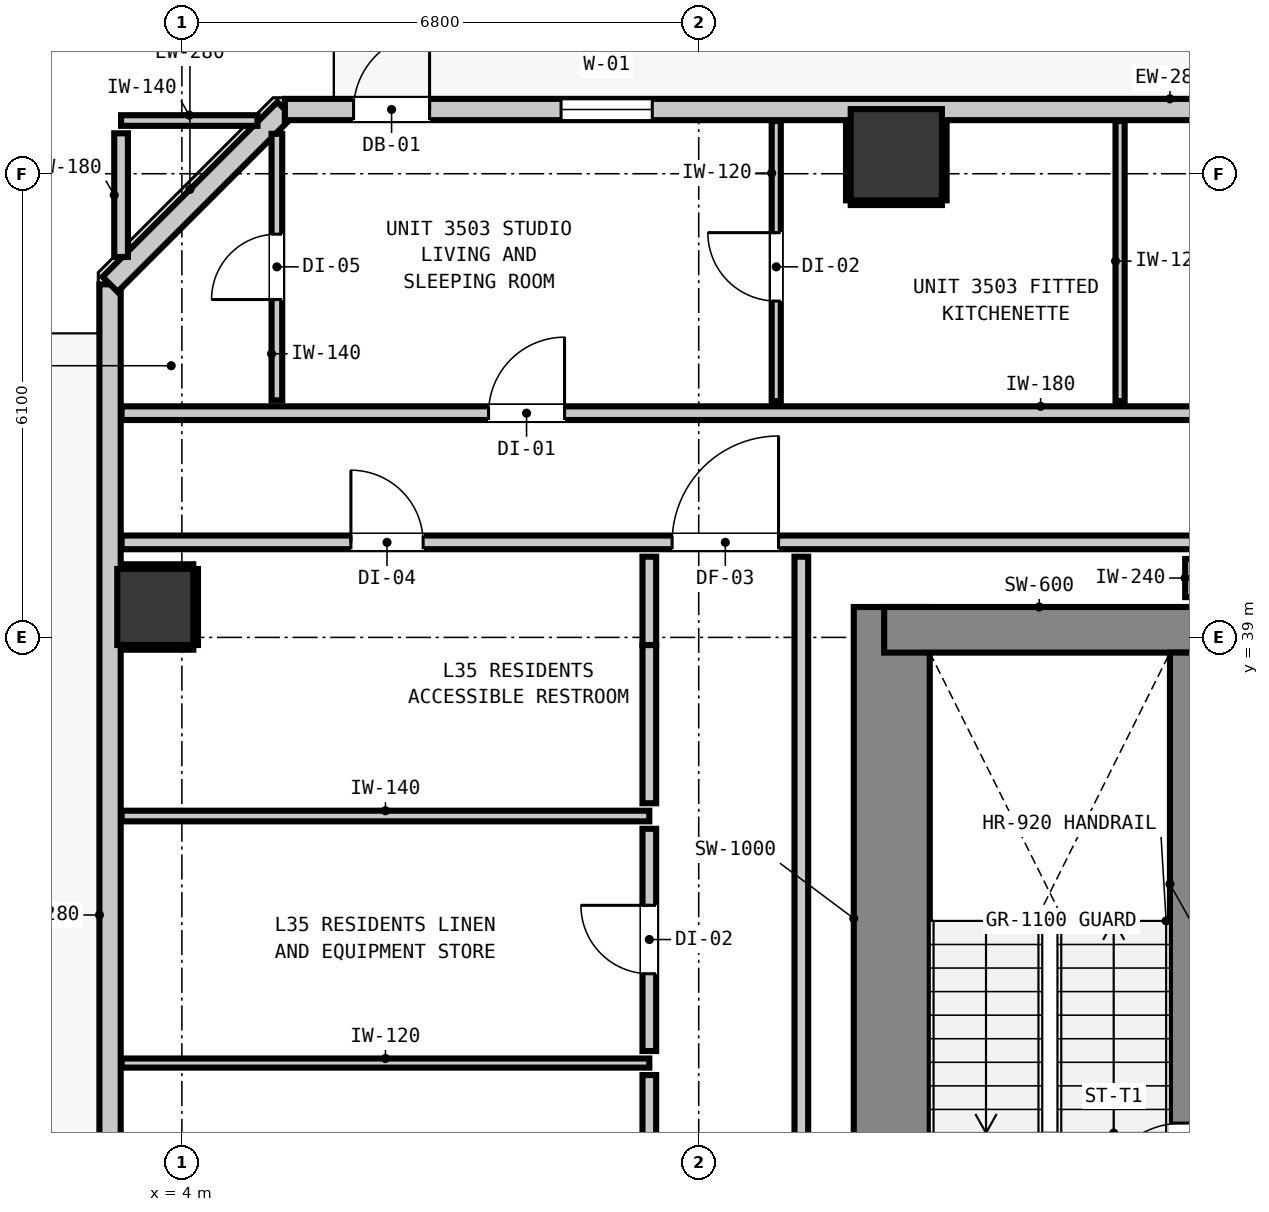
"""IFC4 building model, lengths in metres.
Left out: names, types, materials, properties, quantities, classifications, styles, units other than length and angle.
Written with IfcOpenShell. Run it as: python <this file> out.ifc"""

import sys

from ifc_helpers import new_model, si_unit, direction, frame, frame_2d, origin, origin_2d, place, context, subcontext, project, spatial, rectangle, extrude, element, fill, save


model = new_model("IFC4")
c1 = context("Model", 3, precision=1e-05, world=origin(), true_north=direction((0.0, 1.0)))
c2 = subcontext(c1, "Body", "Model", "MODEL_VIEW")
j1 = project(units=[si_unit("LENGTHUNIT", "METRE"), si_unit("PLANEANGLEUNIT", "RADIAN")], contexts=[c1])
p1 = place(None, origin())
s1 = spatial("IfcSite", under=j1, at=p1, CompositionType="ELEMENT")
p2 = place(p1, origin())
s2 = spatial("IfcBuilding", under=s1, at=p2, CompositionType="ELEMENT")
p3 = place(p2, frame((0.0, 0.0, 122.68)))
s3 = spatial("IfcBuildingStorey", under=s2, at=p3, CompositionType="ELEMENT", Elevation=122.68)
p4 = place(p3, frame((13.34, 31.205, 0.0), z_axis=(0.0, 0.0, 1.0), x_axis=(0.0, 1.0, 0.0)))
e1 = element("IfcWall", 1, at=p4, inside=s3, PredefinedType="SHEAR", context=c2, shape_type="SweptSolid", body=[
    extrude(rectangle(XDim=8.195, YDim=1.0, at=frame_2d((4.097, 0.0))), origin(), (0.0, 0.0, 1.0), 3.32),
])
p5 = place(p3, frame((13.24, 39.1, 0.0), z_axis=(0.0, 0.0, 1.0), x_axis=(1.0, 0.0, 0.0)))
e2 = element("IfcWall", 2, at=p5, inside=s3, PredefinedType="SHEAR", context=c2, shape_type="SweptSolid", body=[
    extrude(rectangle(XDim=4.08, YDim=0.6, at=frame_2d((2.04, 0.0))), origin(), (0.0, 0.0, 1.0), 3.32),
])
p6 = place(p3, frame((17.16, 31.0, 0.0), z_axis=(0.0, 0.0, 1.0), x_axis=(0.0, 1.0, 0.0)))
e3 = element("IfcWall", 3, at=p6, inside=s3, PredefinedType="SHEAR", context=c2, shape_type="SweptSolid", body=[
    extrude(rectangle(XDim=7.8, YDim=0.32, at=frame_2d((3.9, 0.0))), origin(), (0.0, 0.0, 1.0), 3.32),
])
p7 = place(p6, frame((0.51, 0.0, 0.0)))
e4 = element("IfcOpeningElement", 4, at=p7, cuts=e3, PredefinedType="OPENING", context=c2, shape_type="SweptSolid", body=[
    extrude(rectangle(XDim=1.1, YDim=2.15, at=frame_2d((0.55, 1.075))), frame((0.0, 0.17, 0.0), z_axis=(0.0, -1.0, 0.0), x_axis=(1.0, 0.0, 0.0)), (0.0, 0.0, 1.0), 0.34),
])
p8 = place(p3, frame((13.4, 45.35, 0.0), z_axis=(0.0, 0.0, 1.0), x_axis=(1.0, 0.0, 0.0)))
e5 = element("IfcColumn", 5, at=p8, inside=s3, PredefinedType="COLUMN", context=c2, shape_type="SweptSolid", body=[
    extrude(rectangle(XDim=1.2, YDim=1.2, at=origin_2d()), origin(), (0.0, 0.0, 1.0), 2.9),
])
p9 = place(p3, frame((3.65, 39.4, 0.0), z_axis=(0.0, 0.0, 1.0), x_axis=(1.0, 0.0, 0.0)))
e6 = element("IfcColumn", 6, at=p9, inside=s3, PredefinedType="COLUMN", context=c2, shape_type="SweptSolid", body=[
    extrude(rectangle(XDim=1.0, YDim=1.0, at=origin_2d()), origin(), (0.0, 0.0, 1.0), 2.9),
])
p10 = place(p3, frame((3.055, 11.355, 0.0), z_axis=(0.0, 0.0, 1.0), x_axis=(0.0, 1.0, 0.0)))
e7 = element("IfcWall", 7, at=p10, inside=s3, PredefinedType="STANDARD", context=c2, shape_type="SweptSolid", body=[
    extrude(rectangle(XDim=32.29, YDim=0.28, at=frame_2d((16.145, 0.0))), origin(), (0.0, 0.0, 1.0), 2.9),
])
p11 = place(p10, frame((5.818, 0.0, 0.0)))
e8 = element("IfcOpeningElement", 8, at=p11, cuts=e7, PredefinedType="OPENING", context=c2, shape_type="SweptSolid", body=[
    extrude(rectangle(XDim=1.0, YDim=2.15, at=frame_2d((0.5, 1.075))), frame((0.0, 0.15, 0.0), z_axis=(0.0, -1.0, 0.0), x_axis=(1.0, 0.0, 0.0)), (0.0, 0.0, 1.0), 0.3),
])
p12 = place(p10, frame((0.47, 0.0, 0.85)))
e9 = element("IfcOpeningElement", 9, at=p12, cuts=e7, PredefinedType="OPENING", context=c2, shape_type="SweptSolid", body=[
    extrude(rectangle(XDim=1.2, YDim=1.8, at=frame_2d((0.6, 0.9))), frame((0.0, 0.15, 0.0), z_axis=(0.0, -1.0, 0.0), x_axis=(1.0, 0.0, 0.0)), (0.0, 0.0, 1.0), 0.3),
])
p13 = place(p10, frame((14.395, 0.0, 0.85)))
e10 = element("IfcOpeningElement", 10, at=p13, cuts=e7, PredefinedType="OPENING", context=c2, shape_type="SweptSolid", body=[
    extrude(rectangle(XDim=1.2, YDim=1.8, at=frame_2d((0.6, 0.9))), frame((0.0, 0.15, 0.0), z_axis=(0.0, -1.0, 0.0), x_axis=(1.0, 0.0, 0.0)), (0.0, 0.0, 1.0), 0.3),
])
p14 = place(p3, frame((3.055, 43.645, 0.0), z_axis=(0.0, 0.0, 1.0), x_axis=(0.707106781187, 0.707106781187, 0.0)))
e11 = element("IfcWall", 11, at=p14, inside=s3, PredefinedType="STANDARD", context=c2, shape_type="SweptSolid", body=[
    extrude(rectangle(XDim=3.253, YDim=0.28, at=frame_2d((1.626, 0.0))), origin(), (0.0, 0.0, 1.0), 2.9),
])
p15 = place(p3, frame((5.355, 45.945, 0.0), z_axis=(0.0, 0.0, 1.0), x_axis=(1.0, 0.0, 0.0)))
e12 = element("IfcWall", 12, at=p15, inside=s3, PredefinedType="STANDARD", context=c2, shape_type="SweptSolid", body=[
    extrude(rectangle(XDim=35.09, YDim=0.28, at=frame_2d((17.545, 0.0))), origin(), (0.0, 0.0, 1.0), 2.9),
])
p16 = place(p15, frame((0.904, 0.0, 0.0)))
e13 = element("IfcOpeningElement", 13, at=p16, cuts=e12, PredefinedType="OPENING", context=c2, shape_type="SweptSolid", body=[
    extrude(rectangle(XDim=1.0, YDim=2.15, at=frame_2d((0.5, 1.075))), frame((0.0, 0.15, 0.0), z_axis=(0.0, -1.0, 0.0), x_axis=(1.0, 0.0, 0.0)), (0.0, 0.0, 1.0), 0.3),
])
p17 = place(p15, frame((3.634, 0.0, 0.85)))
e14 = element("IfcOpeningElement", 14, at=p17, cuts=e12, PredefinedType="OPENING", context=c2, shape_type="SweptSolid", body=[
    extrude(rectangle(XDim=1.2, YDim=1.8, at=frame_2d((0.6, 0.9))), frame((0.0, 0.15, 0.0), z_axis=(0.0, -1.0, 0.0), x_axis=(1.0, 0.0, 0.0)), (0.0, 0.0, 1.0), 0.3),
])
p18 = place(p15, frame((18.455, 0.0, 0.85)))
e15 = element("IfcOpeningElement", 15, at=p18, cuts=e12, PredefinedType="OPENING", context=c2, shape_type="SweptSolid", body=[
    extrude(rectangle(XDim=1.2, YDim=1.8, at=frame_2d((0.6, 0.9))), frame((0.0, 0.15, 0.0), z_axis=(0.0, -1.0, 0.0), x_axis=(1.0, 0.0, 0.0)), (0.0, 0.0, 1.0), 0.3),
])
p19 = place(p15, frame((26.895, 0.0, 0.85)))
e16 = element("IfcOpeningElement", 16, at=p19, cuts=e12, PredefinedType="OPENING", context=c2, shape_type="SweptSolid", body=[
    extrude(rectangle(XDim=1.2, YDim=1.8, at=frame_2d((0.6, 0.9))), frame((0.0, 0.15, 0.0), z_axis=(0.0, -1.0, 0.0), x_axis=(1.0, 0.0, 0.0)), (0.0, 0.0, 1.0), 0.3),
])
p20 = place(p3, frame((3.207, 40.25, 0.0), z_axis=(0.0, 0.0, 1.0), x_axis=(1.0, 0.0, 0.0)))
e17 = element("IfcWall", 17, at=p20, inside=s3, PredefinedType="PARTITIONING", context=c2, shape_type="SweptSolid", body=[
    extrude(rectangle(XDim=39.386, YDim=0.18, at=frame_2d((19.693, 0.0))), origin(), (0.0, 0.0, 1.0), 2.9),
])
p21 = place(p20, frame((14.228, 0.0, 0.0)))
e18 = element("IfcOpeningElement", 18, at=p21, cuts=e17, PredefinedType="OPENING", context=c2, shape_type="SweptSolid", body=[
    extrude(rectangle(XDim=1.4, YDim=2.15, at=frame_2d((0.7, 1.075))), frame((0.0, 0.1, 0.0), z_axis=(0.0, -1.0, 0.0), x_axis=(1.0, 0.0, 0.0)), (0.0, 0.0, 1.0), 0.2),
])
p22 = place(p20, frame((7.243, 0.0, 0.0)))
e19 = element("IfcOpeningElement", 19, at=p22, cuts=e17, PredefinedType="OPENING", context=c2, shape_type="SweptSolid", body=[
    extrude(rectangle(XDim=1.4, YDim=2.15, at=frame_2d((0.7, 1.075))), frame((0.0, 0.1, 0.0), z_axis=(0.0, -1.0, 0.0), x_axis=(1.0, 0.0, 0.0)), (0.0, 0.0, 1.0), 0.2),
])
p23 = place(p20, frame((34.843, 0.0, 0.0)))
e20 = element("IfcOpeningElement", 20, at=p23, cuts=e17, PredefinedType="OPENING", context=c2, shape_type="SweptSolid", body=[
    extrude(rectangle(XDim=1.4, YDim=2.15, at=frame_2d((0.7, 1.075))), frame((0.0, 0.1, 0.0), z_axis=(0.0, -1.0, 0.0), x_axis=(1.0, 0.0, 0.0)), (0.0, 0.0, 1.0), 0.2),
])
p24 = place(p20, frame((3.017, 0.0, 0.0)))
e21 = element("IfcOpeningElement", 21, at=p24, cuts=e17, PredefinedType="OPENING", context=c2, shape_type="SweptSolid", body=[
    extrude(rectangle(XDim=0.95, YDim=2.1, at=frame_2d((0.475, 1.05))), frame((0.0, 0.1, 0.0), z_axis=(0.0, -1.0, 0.0), x_axis=(1.0, 0.0, 0.0)), (0.0, 0.0, 1.0), 0.2),
])
p25 = place(p20, frame((37.414, 0.0, 0.0)))
e22 = element("IfcOpeningElement", 22, at=p25, cuts=e17, PredefinedType="OPENING", context=c2, shape_type="SweptSolid", body=[
    extrude(rectangle(XDim=0.9, YDim=2.1, at=frame_2d((0.45, 1.05))), frame((0.0, 0.1, 0.0), z_axis=(0.0, -1.0, 0.0), x_axis=(1.0, 0.0, 0.0)), (0.0, 0.0, 1.0), 0.2),
])
p26 = place(p3, frame((3.207, 41.95, 0.0), z_axis=(0.0, 0.0, 1.0), x_axis=(1.0, 0.0, 0.0)))
e23 = element("IfcWall", 23, at=p26, inside=s3, PredefinedType="PARTITIONING", context=c2, shape_type="SweptSolid", body=[
    extrude(rectangle(XDim=39.386, YDim=0.18, at=frame_2d((19.693, 0.0))), origin(), (0.0, 0.0, 1.0), 2.9),
])
p27 = place(p26, frame((4.828, 0.0, 0.0)))
e24 = element("IfcOpeningElement", 24, at=p27, cuts=e23, PredefinedType="OPENING", context=c2, shape_type="SweptSolid", body=[
    extrude(rectangle(XDim=1.0, YDim=2.15, at=frame_2d((0.5, 1.075))), frame((0.0, 0.1, 0.0), z_axis=(0.0, -1.0, 0.0), x_axis=(1.0, 0.0, 0.0)), (0.0, 0.0, 1.0), 0.2),
])
p28 = place(p26, frame((18.355, 0.0, 0.0)))
e25 = element("IfcOpeningElement", 25, at=p28, cuts=e23, PredefinedType="OPENING", context=c2, shape_type="SweptSolid", body=[
    extrude(rectangle(XDim=0.9, YDim=2.1, at=frame_2d((0.45, 1.05))), frame((0.0, 0.1, 0.0), z_axis=(0.0, -1.0, 0.0), x_axis=(1.0, 0.0, 0.0)), (0.0, 0.0, 1.0), 0.2),
])
p29 = place(p26, frame((31.379, 0.0, 0.0)))
e26 = element("IfcOpeningElement", 26, at=p29, cuts=e23, PredefinedType="OPENING", context=c2, shape_type="SweptSolid", body=[
    extrude(rectangle(XDim=0.9, YDim=2.1, at=frame_2d((0.45, 1.05))), frame((0.0, 0.1, 0.0), z_axis=(0.0, -1.0, 0.0), x_axis=(1.0, 0.0, 0.0)), (0.0, 0.0, 1.0), 0.2),
])
p30 = place(p3, frame((3.207, 36.65, 0.0), z_axis=(0.0, 0.0, 1.0), x_axis=(1.0, 0.0, 0.0)))
e27 = element("IfcWall", 27, at=p30, inside=s3, PredefinedType="PARTITIONING", context=c2, shape_type="SweptSolid", body=[
    extrude(rectangle(XDim=6.943, YDim=0.14, at=frame_2d((3.471, 0.0))), origin(), (0.0, 0.0, 1.0), 2.9),
])
p31 = place(p3, frame((3.2, 45.8, 0.0), z_axis=(0.0, 0.0, 1.0), x_axis=(1.0, 0.0, 0.0)))
e28 = element("IfcWall", 28, at=p31, inside=s3, PredefinedType="PARTITIONING", context=c2, shape_type="SweptSolid", body=[
    extrude(rectangle(XDim=1.795, YDim=0.14, at=frame_2d((0.897, 0.0))), origin(), (0.0, 0.0, 1.0), 2.9),
])
p32 = place(p3, frame((3.207, 33.4, 0.0), z_axis=(0.0, 0.0, 1.0), x_axis=(1.0, 0.0, 0.0)))
e29 = element("IfcWall", 29, at=p32, inside=s3, PredefinedType="PARTITIONING", context=c2, shape_type="SweptSolid", body=[
    extrude(rectangle(XDim=6.943, YDim=0.12, at=frame_2d((3.471, 0.0))), origin(), (0.0, 0.0, 1.0), 2.9),
])
p33 = place(p3, frame((17.32, 39.53, 0.0), z_axis=(0.0, 0.0, 1.0), x_axis=(0.0, 1.0, 0.0)))
e30 = element("IfcWall", 30, at=p33, inside=s3, PredefinedType="PARTITIONING", context=c2, shape_type="SweptSolid", body=[
    extrude(rectangle(XDim=0.502, YDim=0.24, at=frame_2d((0.251, 0.0))), origin(), (0.0, 0.0, 1.0), 2.9),
])
p34 = place(p3, frame((3.2, 44.005, 0.0), z_axis=(0.0, 0.0, 1.0), x_axis=(0.0, 1.0, 0.0)))
e31 = element("IfcWall", 31, at=p34, inside=s3, PredefinedType="PARTITIONING", context=c2, shape_type="SweptSolid", body=[
    extrude(rectangle(XDim=1.627, YDim=0.18, at=frame_2d((0.813, 0.0))), origin(), (0.0, 0.0, 1.0), 2.9),
])
p35 = place(p3, frame((10.15, 31.2, 0.0), z_axis=(0.0, 0.0, 1.0), x_axis=(0.0, 1.0, 0.0)))
e32 = element("IfcWall", 32, at=p35, inside=s3, PredefinedType="PARTITIONING", context=c2, shape_type="SweptSolid", body=[
    extrude(rectangle(XDim=2.042, YDim=0.18, at=frame_2d((1.021, 0.0))), origin(), (0.0, 0.0, 1.0), 2.285),
])
p36 = place(p3, frame((10.15, 33.558, 0.0), z_axis=(0.0, 0.0, 1.0), x_axis=(0.0, 1.0, 0.0)))
e33 = element("IfcWall", 33, at=p36, inside=s3, PredefinedType="PARTITIONING", context=c2, shape_type="SweptSolid", body=[
    extrude(rectangle(XDim=2.924, YDim=0.18, at=frame_2d((1.462, 0.0))), origin(), (0.0, 0.0, 1.0), 2.285),
])
p37 = place(p36, frame((1.017, 0.0, 0.0)))
e34 = element("IfcOpeningElement", 34, at=p37, cuts=e33, PredefinedType="OPENING", context=c2, shape_type="SweptSolid", body=[
    extrude(rectangle(XDim=0.9, YDim=2.1, at=frame_2d((0.45, 1.05))), frame((0.0, 0.1, 0.0), z_axis=(0.0, -1.0, 0.0), x_axis=(1.0, 0.0, 0.0)), (0.0, 0.0, 1.0), 0.2),
])
p38 = place(p3, frame((10.15, 36.818, 0.0), z_axis=(0.0, 0.0, 1.0), x_axis=(0.0, 1.0, 0.0)))
e35 = element("IfcWall", 35, at=p38, inside=s3, PredefinedType="PARTITIONING", context=c2, shape_type="SweptSolid", body=[
    extrude(rectangle(XDim=2.082, YDim=0.18, at=frame_2d((1.041, 0.0))), origin(), (0.0, 0.0, 1.0), 2.285),
])
p39 = place(p3, frame((10.15, 38.9, 0.0), z_axis=(0.0, 0.0, 1.0), x_axis=(0.0, 1.0, 0.0)))
e36 = element("IfcWall", 36, at=p39, inside=s3, PredefinedType="PARTITIONING", context=c2, shape_type="SweptSolid", body=[
    extrude(rectangle(XDim=1.162, YDim=0.18, at=frame_2d((0.581, 0.0))), origin(), (0.0, 0.0, 1.0), 2.9),
])
p40 = place(p3, frame((12.15, 21.368, 0.0), z_axis=(0.0, 0.0, 1.0), x_axis=(0.0, 1.0, 0.0)))
e37 = element("IfcWall", 37, at=p40, inside=s3, PredefinedType="PARTITIONING", context=c2, shape_type="SweptSolid", body=[
    extrude(rectangle(XDim=18.694, YDim=0.18, at=frame_2d((9.347, 0.0))), origin(), (0.0, 0.0, 1.0), 2.9),
])
p41 = place(p3, frame((5.25, 42.118, 0.0), z_axis=(0.0, 0.0, 1.0), x_axis=(0.0, 1.0, 0.0)))
e38 = element("IfcWall", 38, at=p41, inside=s3, PredefinedType="PARTITIONING", context=c2, shape_type="SweptSolid", body=[
    extrude(rectangle(XDim=3.507, YDim=0.14, at=frame_2d((1.753, 0.0))), origin(), (0.0, 0.0, 1.0), 2.9),
])
p42 = place(p41, frame((1.327, 0.0, 0.0)))
e39 = element("IfcOpeningElement", 39, at=p42, cuts=e38, PredefinedType="OPENING", context=c2, shape_type="SweptSolid", body=[
    extrude(rectangle(XDim=0.86, YDim=2.02, at=frame_2d((0.43, 1.01))), frame((0.0, 0.08, 0.0), z_axis=(0.0, -1.0, 0.0), x_axis=(1.0, 0.0, 0.0)), (0.0, 0.0, 1.0), 0.16),
])
p43 = place(p3, frame((11.82, 42.108, 0.0), z_axis=(0.0, 0.0, 1.0), x_axis=(0.0, 1.0, 0.0)))
e40 = element("IfcWall", 40, at=p43, inside=s3, PredefinedType="PARTITIONING", context=c2, shape_type="SweptSolid", body=[
    extrude(rectangle(XDim=3.685, YDim=0.12, at=frame_2d((1.843, 0.0))), origin(), (0.0, 0.0, 1.0), 2.9),
])
p44 = place(p43, frame((1.317, 0.0, 0.0)))
e41 = element("IfcOpeningElement", 41, at=p44, cuts=e40, PredefinedType="OPENING", context=c2, shape_type="SweptSolid", body=[
    extrude(rectangle(XDim=0.9, YDim=2.1, at=frame_2d((0.45, 1.05))), frame((0.0, 0.07, 0.0), z_axis=(0.0, -1.0, 0.0), x_axis=(1.0, 0.0, 0.0)), (0.0, 0.0, 1.0), 0.14),
])
p45 = place(p3, frame((16.344, 42.108, 0.0), z_axis=(0.0, 0.0, 1.0), x_axis=(0.0, 1.0, 0.0)))
e42 = element("IfcWall", 42, at=p45, inside=s3, PredefinedType="PARTITIONING", context=c2, shape_type="SweptSolid", body=[
    extrude(rectangle(XDim=3.685, YDim=0.12, at=frame_2d((1.843, 0.0))), origin(), (0.0, 0.0, 1.0), 2.9),
])
p46 = place(p3, frame((12.8, 44.718, 0.0), z_axis=(0.0, 0.0, 1.0), x_axis=(1.0, 0.0, 0.0)))
e43 = element("IfcWall", 43, at=p46, inside=s3, PredefinedType="PARTITIONING", context=c2, shape_type="SweptSolid", body=[
    extrude(rectangle(XDim=1.2, YDim=0.06, at=frame_2d((0.6, 0.0))), origin(), (0.0, 0.0, 1.0), 1.45),
])
for number, where, z_axis, x_axis in (
    (44, (12.768, 44.75, 0.0), (0.0, 0.0, 1.0), (0.0, 1.0, 0.0)),
    (45, (14.032, 44.75, 0.0), (0.0, 0.0, 1.0), (0.0, 1.0, 0.0)),
):
    element("IfcWall", number, at=place(p3, frame(where, z_axis=z_axis, x_axis=x_axis)), inside=s3, PredefinedType="PARTITIONING", context=c2, shape_type="SweptSolid", body=[
        extrude(rectangle(XDim=1.04, YDim=0.06, at=frame_2d((0.52, 0.0))), origin(), (0.0, 0.0, 1.0), 0.905),
    ])
for number, where, z_axis, x_axis in (
    (46, (3.21, 38.868, 0.0), (0.0, 0.0, 1.0), (1.0, 0.0, 0.0)),
    (47, (3.21, 39.932, 0.0), (0.0, 0.0, 1.0), (1.0, 0.0, 0.0)),
):
    element("IfcWall", number, at=place(p3, frame(where, z_axis=z_axis, x_axis=x_axis)), inside=s3, PredefinedType="PARTITIONING", context=c2, shape_type="SweptSolid", body=[
        extrude(rectangle(XDim=0.94, YDim=0.06, at=frame_2d((0.47, 0.0))), origin(), (0.0, 0.0, 1.0), 0.905),
    ])
p47 = place(p3, frame((4.182, 38.9, 0.0), z_axis=(0.0, 0.0, 1.0), x_axis=(0.0, 1.0, 0.0)))
e48 = element("IfcWall", 48, at=p47, inside=s3, PredefinedType="PARTITIONING", context=c2, shape_type="SweptSolid", body=[
    extrude(rectangle(XDim=1.0, YDim=0.06, at=frame_2d((0.5, 0.0))), origin(), (0.0, 0.0, 1.0), 1.45),
])
p48 = place(p16, origin())
e49 = element("IfcDoor", 49, at=p48, inside=s3, OperationType="SINGLE_SWING_RIGHT", PredefinedType="DOOR", context=c2, shape_type="SweptSolid", body=[
    extrude(rectangle(XDim=1.0, YDim=2.15, at=frame_2d((0.5, 1.075))), frame((0.0, 0.025, 0.0), z_axis=(0.0, -1.0, 0.0), x_axis=(1.0, 0.0, 0.0)), (0.0, 0.0, 1.0), 0.05),
])
fill(e13, e49)
p49 = place(p17, origin())
e50 = element("IfcWindow", 50, at=p49, inside=s3, PartitioningType="SINGLE_PANEL", PredefinedType="WINDOW", context=c2, shape_type="SweptSolid", body=[
    extrude(rectangle(XDim=1.2, YDim=1.8, at=frame_2d((0.6, 0.9))), frame((0.0, 0.03, 0.0), z_axis=(0.0, -1.0, 0.0), x_axis=(1.0, 0.0, 0.0)), (0.0, 0.0, 1.0), 0.06),
])
fill(e14, e50)
p50 = place(p7, origin())
e51 = element("IfcDoor", 51, at=p50, inside=s3, OperationType="SINGLE_SWING_LEFT", PredefinedType="DOOR", context=c2, shape_type="SweptSolid", body=[
    extrude(rectangle(XDim=1.1, YDim=2.15, at=frame_2d((0.55, 1.075))), frame((0.0, 0.025, 0.0), z_axis=(0.0, -1.0, 0.0), x_axis=(1.0, 0.0, 0.0)), (0.0, 0.0, 1.0), 0.05),
])
fill(e4, e51)
p51 = place(p22, origin())
e52 = element("IfcDoor", 52, at=p51, inside=s3, OperationType="SINGLE_SWING_RIGHT", PredefinedType="DOOR", context=c2, shape_type="SweptSolid", body=[
    extrude(rectangle(XDim=1.4, YDim=2.15, at=frame_2d((0.7, 1.075))), frame((0.0, 0.025, 0.0), z_axis=(0.0, -1.0, 0.0), x_axis=(1.0, 0.0, 0.0)), (0.0, 0.0, 1.0), 0.05),
])
fill(e19, e52)
p52 = place(p27, origin())
e53 = element("IfcDoor", 53, at=p52, inside=s3, OperationType="SINGLE_SWING_RIGHT", PredefinedType="DOOR", context=c2, shape_type="SweptSolid", body=[
    extrude(rectangle(XDim=1.0, YDim=2.15, at=frame_2d((0.5, 1.075))), frame((0.0, 0.025, 0.0), z_axis=(0.0, -1.0, 0.0), x_axis=(1.0, 0.0, 0.0)), (0.0, 0.0, 1.0), 0.05),
])
fill(e24, e53)
p53 = place(p42, origin())
e54 = element("IfcDoor", 54, at=p53, inside=s3, OperationType="SINGLE_SWING_LEFT", PredefinedType="DOOR", context=c2, shape_type="SweptSolid", body=[
    extrude(rectangle(XDim=0.86, YDim=2.02, at=frame_2d((0.43, 1.01))), frame((0.0, 0.025, 0.0), z_axis=(0.0, -1.0, 0.0), x_axis=(1.0, 0.0, 0.0)), (0.0, 0.0, 1.0), 0.05),
])
fill(e39, e54)
p54 = place(p44, origin())
e55 = element("IfcDoor", 55, at=p54, inside=s3, OperationType="SINGLE_SWING_RIGHT", PredefinedType="DOOR", context=c2, shape_type="SweptSolid", body=[
    extrude(rectangle(XDim=0.9, YDim=2.1, at=frame_2d((0.45, 1.05))), frame((0.0, 0.025, 0.0), z_axis=(0.0, -1.0, 0.0), x_axis=(1.0, 0.0, 0.0)), (0.0, 0.0, 1.0), 0.05),
])
fill(e41, e55)
p55 = place(p37, origin())
e56 = element("IfcDoor", 56, at=p55, inside=s3, OperationType="SINGLE_SWING_RIGHT", PredefinedType="DOOR", context=c2, shape_type="SweptSolid", body=[
    extrude(rectangle(XDim=0.9, YDim=2.1, at=frame_2d((0.45, 1.05))), frame((0.0, 0.025, 0.0), z_axis=(0.0, -1.0, 0.0), x_axis=(1.0, 0.0, 0.0)), (0.0, 0.0, 1.0), 0.05),
])
fill(e34, e56)
p56 = place(p24, origin())
e57 = element("IfcDoor", 57, at=p56, inside=s3, OperationType="SINGLE_SWING_LEFT", PredefinedType="DOOR", context=c2, shape_type="SweptSolid", body=[
    extrude(rectangle(XDim=0.95, YDim=2.1, at=frame_2d((0.475, 1.05))), frame((0.0, 0.025, 0.0), z_axis=(0.0, -1.0, 0.0), x_axis=(1.0, 0.0, 0.0)), (0.0, 0.0, 1.0), 0.05),
])
fill(e21, e57)
save(model, sys.argv[1])
